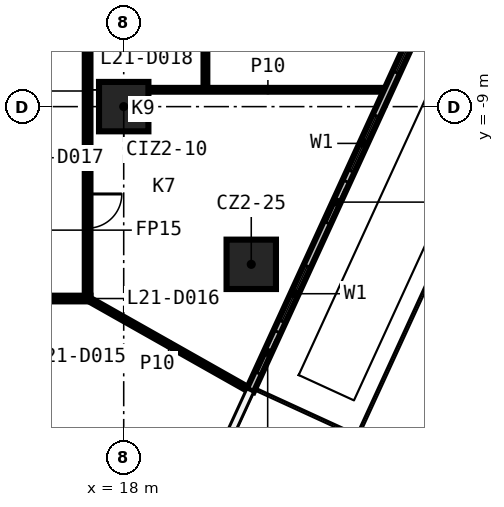
"""IFC4 building model, lengths in metres.
Left out: names, types, materials, properties, quantities, classifications, styles, units other than length and angle.
Written with IfcOpenShell. Run it as: python <this file> out.ifc"""

import sys

from ifc_helpers import new_model, si_unit, direction, frame, frame_2d, origin, origin_2d, place, context, subcontext, project, spatial, rectangle, extrude, element, fill, save


model = new_model("IFC4")
c1 = context("Model", 3, precision=1e-05, world=origin(), true_north=direction((0.0, 1.0)))
c2 = subcontext(c1, "Body", "Model", "MODEL_VIEW")
j1 = project(units=[si_unit("LENGTHUNIT", "METRE"), si_unit("PLANEANGLEUNIT", "RADIAN")], contexts=[c1])
p1 = place(None, origin())
s1 = spatial("IfcSite", under=j1, at=p1, CompositionType="ELEMENT")
p2 = place(p1, origin())
s2 = spatial("IfcBuilding", under=s1, at=p2, CompositionType="ELEMENT")
p3 = place(p2, frame((0.0, 0.0, 102.6)))
s3 = spatial("IfcBuildingStorey", under=s2, at=p3, CompositionType="ELEMENT", Elevation=102.6)
for number, where, z_axis, x_axis in (
    (1, (21.356, -13.15, 0.0), (0.0, 0.0, 1.0), (1.0, 0.0, 0.0)),
    (2, (18.0, -9.0, 0.0), (0.0, 0.0, 1.0), (1.0, 0.0, 0.0)),
):
    element("IfcColumn", number, at=place(p3, frame(where, z_axis=z_axis, x_axis=x_axis)), inside=s3, PredefinedType="COLUMN", context=c2, shape_type="SweptSolid", body=[
        extrude(rectangle(XDim=1.3, YDim=1.3, at=origin_2d()), origin(), (0.0, 0.0, 1.0), 3.3),
    ])
p4 = place(p3, frame((17.125, -14.05, 0.0), z_axis=(0.0, 0.0, 1.0), x_axis=(-1.0, 0.0, 0.0)))
e3 = element("IfcWall", 3, at=p4, inside=s3, PredefinedType="PARTITIONING", context=c2, shape_type="SweptSolid", body=[
    extrude(rectangle(XDim=34.25, YDim=0.15, at=frame_2d((17.125, 0.0))), origin(), (0.0, 0.0, 1.0), 3.3),
])
p5 = place(p4, frame((32.158, 0.0, 0.0)))
e4 = element("IfcOpeningElement", 4, at=p5, cuts=e3, PredefinedType="OPENING", context=c2, shape_type="SweptSolid", body=[
    extrude(rectangle(XDim=0.9, YDim=2.1, at=frame_2d((0.45, 1.05))), frame((0.0, 0.085, 0.0), z_axis=(0.0, -1.0, 0.0), x_axis=(1.0, 0.0, 0.0)), (0.0, 0.0, 1.0), 0.17),
])
p6 = place(p4, frame((27.561, 0.0, 0.0)))
e5 = element("IfcOpeningElement", 5, at=p6, cuts=e3, PredefinedType="OPENING", context=c2, shape_type="SweptSolid", body=[
    extrude(rectangle(XDim=1.0, YDim=2.1, at=frame_2d((0.5, 1.05))), frame((0.0, 0.085, 0.0), z_axis=(0.0, -1.0, 0.0), x_axis=(1.0, 0.0, 0.0)), (0.0, 0.0, 1.0), 0.17),
])
p7 = place(p4, frame((18.64, 0.0, 0.0)))
e6 = element("IfcOpeningElement", 6, at=p7, cuts=e3, PredefinedType="OPENING", context=c2, shape_type="SweptSolid", body=[
    extrude(rectangle(XDim=1.0, YDim=2.1, at=frame_2d((0.5, 1.05))), frame((0.0, 0.085, 0.0), z_axis=(0.0, -1.0, 0.0), x_axis=(1.0, 0.0, 0.0)), (0.0, 0.0, 1.0), 0.17),
])
p8 = place(p4, frame((16.624, 0.0, 0.0)))
e7 = element("IfcOpeningElement", 7, at=p8, cuts=e3, PredefinedType="OPENING", context=c2, shape_type="SweptSolid", body=[
    extrude(rectangle(XDim=1.0, YDim=2.1, at=frame_2d((0.5, 1.05))), frame((0.0, 0.085, 0.0), z_axis=(0.0, -1.0, 0.0), x_axis=(1.0, 0.0, 0.0)), (0.0, 0.0, 1.0), 0.17),
])
p9 = place(p4, frame((9.807, 0.0, 0.0)))
e8 = element("IfcOpeningElement", 8, at=p9, cuts=e3, PredefinedType="OPENING", context=c2, shape_type="SweptSolid", body=[
    extrude(rectangle(XDim=1.0, YDim=2.1, at=frame_2d((0.5, 1.05))), frame((0.0, 0.085, 0.0), z_axis=(0.0, -1.0, 0.0), x_axis=(1.0, 0.0, 0.0)), (0.0, 0.0, 1.0), 0.17),
])
p10 = place(p4, frame((7.795, 0.0, 0.0)))
e9 = element("IfcOpeningElement", 9, at=p10, cuts=e3, PredefinedType="OPENING", context=c2, shape_type="SweptSolid", body=[
    extrude(rectangle(XDim=1.0, YDim=2.1, at=frame_2d((0.5, 1.05))), frame((0.0, 0.085, 0.0), z_axis=(0.0, -1.0, 0.0), x_axis=(1.0, 0.0, 0.0)), (0.0, 0.0, 1.0), 0.17),
])
p11 = place(p4, frame((1.119, 0.0, 0.0)))
e10 = element("IfcOpeningElement", 10, at=p11, cuts=e3, PredefinedType="OPENING", context=c2, shape_type="SweptSolid", body=[
    extrude(rectangle(XDim=1.0, YDim=2.1, at=frame_2d((0.5, 1.05))), frame((0.0, 0.085, 0.0), z_axis=(0.0, -1.0, 0.0), x_axis=(1.0, 0.0, 0.0)), (0.0, 0.0, 1.0), 0.17),
])
p12 = place(p3, frame((18.65, -8.557, 0.0), z_axis=(0.0, 0.0, 1.0), x_axis=(1.0, 0.0, 0.0)))
e11 = element("IfcWall", 11, at=p12, inside=s3, PredefinedType="PARTITIONING", context=c2, shape_type="SweptSolid", body=[
    extrude(rectangle(XDim=6.288, YDim=0.1, at=frame_2d((3.144, 0.0))), origin(), (0.0, 0.0, 1.0), 3.3),
])
p13 = place(p3, frame((20.15, -8.507, 0.0), z_axis=(0.0, 0.0, 1.0), x_axis=(0.0, 1.0, 0.0)))
e12 = element("IfcWall", 12, at=p13, inside=s3, PredefinedType="PARTITIONING", context=c2, shape_type="SweptSolid", body=[
    extrude(rectangle(XDim=2.3, YDim=0.1, at=frame_2d((1.15, 0.0))), origin(), (0.0, 0.0, 1.0), 3.3),
])
p14 = place(p3, frame((17.05, 13.975, 0.0), z_axis=(0.0, 0.0, 1.0), x_axis=(0.0, -1.0, 0.0)))
e13 = element("IfcWall", 13, at=p14, inside=s3, PredefinedType="PARTITIONING", context=c2, shape_type="SweptSolid", body=[
    extrude(rectangle(XDim=27.95, YDim=0.15, at=frame_2d((13.975, 0.0))), origin(), (0.0, 0.0, 1.0), 3.3),
])
p15 = place(p14, frame((25.274, 0.0, 0.0)))
e14 = element("IfcOpeningElement", 14, at=p15, cuts=e13, PredefinedType="OPENING", context=c2, shape_type="SweptSolid", body=[
    extrude(rectangle(XDim=0.9, YDim=2.1, at=frame_2d((0.45, 1.05))), frame((0.0, 0.085, 0.0), z_axis=(0.0, -1.0, 0.0), x_axis=(1.0, 0.0, 0.0)), (0.0, 0.0, 1.0), 0.17),
])
p16 = place(p14, frame((18.854, 0.0, 0.0)))
e15 = element("IfcOpeningElement", 15, at=p16, cuts=e13, PredefinedType="OPENING", context=c2, shape_type="SweptSolid", body=[
    extrude(rectangle(XDim=1.0, YDim=2.1, at=frame_2d((0.5, 1.05))), frame((0.0, 0.085, 0.0), z_axis=(0.0, -1.0, 0.0), x_axis=(1.0, 0.0, 0.0)), (0.0, 0.0, 1.0), 0.17),
])
p17 = place(p14, frame((17.299, 0.0, 0.0)))
e16 = element("IfcOpeningElement", 16, at=p17, cuts=e13, PredefinedType="OPENING", context=c2, shape_type="SweptSolid", body=[
    extrude(rectangle(XDim=1.0, YDim=2.1, at=frame_2d((0.5, 1.05))), frame((0.0, 0.085, 0.0), z_axis=(0.0, -1.0, 0.0), x_axis=(1.0, 0.0, 0.0)), (0.0, 0.0, 1.0), 0.17),
])
p18 = place(p14, frame((11.171, 0.0, 0.0)))
e17 = element("IfcOpeningElement", 17, at=p18, cuts=e13, PredefinedType="OPENING", context=c2, shape_type="SweptSolid", body=[
    extrude(rectangle(XDim=0.9, YDim=2.1, at=frame_2d((0.45, 1.05))), frame((0.0, 0.085, 0.0), z_axis=(0.0, -1.0, 0.0), x_axis=(1.0, 0.0, 0.0)), (0.0, 0.0, 1.0), 0.17),
])
p19 = place(p14, frame((7.243, 0.0, 0.0)))
e18 = element("IfcOpeningElement", 18, at=p19, cuts=e13, PredefinedType="OPENING", context=c2, shape_type="SweptSolid", body=[
    extrude(rectangle(XDim=0.9, YDim=2.1, at=frame_2d((0.45, 1.05))), frame((0.0, 0.085, 0.0), z_axis=(0.0, -1.0, 0.0), x_axis=(1.0, 0.0, 0.0)), (0.0, 0.0, 1.0), 0.17),
])
p20 = place(p14, frame((2.153, 0.0, 0.0)))
e19 = element("IfcOpeningElement", 19, at=p20, cuts=e13, PredefinedType="OPENING", context=c2, shape_type="SweptSolid", body=[
    extrude(rectangle(XDim=0.9, YDim=2.1, at=frame_2d((0.45, 1.05))), frame((0.0, 0.085, 0.0), z_axis=(0.0, -1.0, 0.0), x_axis=(1.0, 0.0, 0.0)), (0.0, 0.0, 1.0), 0.17),
])
p21 = place(p3, frame((17.05, -14.05, 0.0), z_axis=(0.0, 0.0, 1.0), x_axis=(0.87059349, -0.492003023537, 0.0)))
e20 = element("IfcWall", 20, at=p21, inside=s3, PredefinedType="PARTITIONING", context=c2, shape_type="SweptSolid", body=[
    extrude(rectangle(XDim=4.895, YDim=0.1, at=frame_2d((2.448, 0.0))), origin(), (0.0, 0.0, 1.0), 3.3),
])
p22 = place(p3, frame((21.329, -16.468, 0.0), z_axis=(0.0, 0.0, 1.0), x_axis=(0.417117833448, 0.908852415423, 0.0)))
e21 = element("IfcWall", 21, at=p22, inside=s3, PredefinedType="SOLIDWALL", context=c2, shape_type="SweptSolid", body=[
    extrude(rectangle(XDim=21.761, YDim=0.2, at=frame_2d((10.881, 0.0))), origin(), (0.0, 0.0, 1.0), 3.25),
])
p23 = place(p22, frame((2.0, 0.0, 0.6)))
e22 = element("IfcOpeningElement", 22, at=p23, cuts=e21, PredefinedType="OPENING", context=c2, shape_type="SweptSolid", body=[
    extrude(rectangle(XDim=1.6, YDim=2.4, at=frame_2d((0.8, 1.2))), frame((0.0, 0.11, 0.0), z_axis=(0.0, -1.0, 0.0), x_axis=(1.0, 0.0, 0.0)), (0.0, 0.0, 1.0), 0.22),
])
p24 = place(p22, frame((0.5, 0.0, 0.0)))
e23 = element("IfcOpeningElement", 23, at=p24, cuts=e21, PredefinedType="OPENING", context=c2, shape_type="SweptSolid", body=[
    extrude(rectangle(XDim=1.2, YDim=2.4, at=frame_2d((0.6, 1.2))), frame((0.0, 0.11, 0.0), z_axis=(0.0, -1.0, 0.0), x_axis=(1.0, 0.0, 0.0)), (0.0, 0.0, 1.0), 0.22),
])
p25 = place(p22, frame((6.352, 0.0, 0.6)))
e24 = element("IfcOpeningElement", 24, at=p25, cuts=e21, PredefinedType="OPENING", context=c2, shape_type="SweptSolid", body=[
    extrude(rectangle(XDim=1.6, YDim=2.4, at=frame_2d((0.8, 1.2))), frame((0.0, 0.11, 0.0), z_axis=(0.0, -1.0, 0.0), x_axis=(1.0, 0.0, 0.0)), (0.0, 0.0, 1.0), 0.22),
])
p26 = place(p22, frame((4.852, 0.0, 0.0)))
e25 = element("IfcOpeningElement", 25, at=p26, cuts=e21, PredefinedType="OPENING", context=c2, shape_type="SweptSolid", body=[
    extrude(rectangle(XDim=1.2, YDim=2.4, at=frame_2d((0.6, 1.2))), frame((0.0, 0.11, 0.0), z_axis=(0.0, -1.0, 0.0), x_axis=(1.0, 0.0, 0.0)), (0.0, 0.0, 1.0), 0.22),
])
p27 = place(p22, frame((9.205, 0.0, 0.6)))
e26 = element("IfcOpeningElement", 26, at=p27, cuts=e21, PredefinedType="OPENING", context=c2, shape_type="SweptSolid", body=[
    extrude(rectangle(XDim=1.6, YDim=2.4, at=frame_2d((0.8, 1.2))), frame((0.0, 0.11, 0.0), z_axis=(0.0, -1.0, 0.0), x_axis=(1.0, 0.0, 0.0)), (0.0, 0.0, 1.0), 0.22),
])
p28 = place(p22, frame((11.205, 0.0, 0.0)))
e27 = element("IfcOpeningElement", 27, at=p28, cuts=e21, PredefinedType="OPENING", context=c2, shape_type="SweptSolid", body=[
    extrude(rectangle(XDim=1.2, YDim=2.4, at=frame_2d((0.6, 1.2))), frame((0.0, 0.11, 0.0), z_axis=(0.0, -1.0, 0.0), x_axis=(1.0, 0.0, 0.0)), (0.0, 0.0, 1.0), 0.22),
])
p29 = place(p22, frame((15.057, 0.0, 0.6)))
e28 = element("IfcOpeningElement", 28, at=p29, cuts=e21, PredefinedType="OPENING", context=c2, shape_type="SweptSolid", body=[
    extrude(rectangle(XDim=1.6, YDim=2.4, at=frame_2d((0.8, 1.2))), frame((0.0, 0.11, 0.0), z_axis=(0.0, -1.0, 0.0), x_axis=(1.0, 0.0, 0.0)), (0.0, 0.0, 1.0), 0.22),
])
p30 = place(p22, frame((13.557, 0.0, 0.0)))
e29 = element("IfcOpeningElement", 29, at=p30, cuts=e21, PredefinedType="OPENING", context=c2, shape_type="SweptSolid", body=[
    extrude(rectangle(XDim=1.2, YDim=2.4, at=frame_2d((0.6, 1.2))), frame((0.0, 0.11, 0.0), z_axis=(0.0, -1.0, 0.0), x_axis=(1.0, 0.0, 0.0)), (0.0, 0.0, 1.0), 0.22),
])
p31 = place(p22, frame((19.909, 0.0, 0.6)))
e30 = element("IfcOpeningElement", 30, at=p31, cuts=e21, PredefinedType="OPENING", context=c2, shape_type="SweptSolid", body=[
    extrude(rectangle(XDim=1.6, YDim=2.4, at=frame_2d((0.8, 1.2))), frame((0.0, 0.11, 0.0), z_axis=(0.0, -1.0, 0.0), x_axis=(1.0, 0.0, 0.0)), (0.0, 0.0, 1.0), 0.22),
])
p32 = place(p22, frame((18.409, 0.0, 0.0)))
e31 = element("IfcOpeningElement", 31, at=p32, cuts=e21, PredefinedType="OPENING", context=c2, shape_type="SweptSolid", body=[
    extrude(rectangle(XDim=1.2, YDim=2.4, at=frame_2d((0.6, 1.2))), frame((0.0, 0.11, 0.0), z_axis=(0.0, -1.0, 0.0), x_axis=(1.0, 0.0, 0.0)), (0.0, 0.0, 1.0), 0.22),
])
p33 = place(p15, origin())
e32 = element("IfcDoor", 32, at=p33, inside=s3, OperationType="SINGLE_SWING_LEFT", PredefinedType="DOOR", context=c2, shape_type="SweptSolid", body=[
    extrude(rectangle(XDim=0.9, YDim=2.1, at=frame_2d((0.45, 1.05))), frame((0.0, 0.025, 0.0), z_axis=(0.0, -1.0, 0.0), x_axis=(1.0, 0.0, 0.0)), (0.0, 0.0, 1.0), 0.05),
])
fill(e14, e32)
p34 = place(p23, origin())
e33 = element("IfcWindow", 33, at=p34, inside=s3, PartitioningType="SINGLE_PANEL", PredefinedType="WINDOW", context=c2, shape_type="SweptSolid", body=[
    extrude(rectangle(XDim=1.6, YDim=2.4, at=frame_2d((0.8, 1.2))), frame((0.0, 0.03, 0.0), z_axis=(0.0, -1.0, 0.0), x_axis=(1.0, 0.0, 0.0)), (0.0, 0.0, 1.0), 0.06),
])
fill(e22, e33)
p35 = place(p24, origin())
e34 = element("IfcDoor", 34, at=p35, inside=s3, OperationType="SLIDING_TO_LEFT", PredefinedType="DOOR", context=c2, shape_type="SweptSolid", body=[
    extrude(rectangle(XDim=1.2, YDim=2.4, at=frame_2d((0.6, 1.2))), frame((0.0, 0.025, 0.0), z_axis=(0.0, -1.0, 0.0), x_axis=(1.0, 0.0, 0.0)), (0.0, 0.0, 1.0), 0.05),
])
fill(e23, e34)
p36 = place(p25, origin())
e35 = element("IfcWindow", 35, at=p36, inside=s3, PartitioningType="SINGLE_PANEL", PredefinedType="WINDOW", context=c2, shape_type="SweptSolid", body=[
    extrude(rectangle(XDim=1.6, YDim=2.4, at=frame_2d((0.8, 1.2))), frame((0.0, 0.03, 0.0), z_axis=(0.0, -1.0, 0.0), x_axis=(1.0, 0.0, 0.0)), (0.0, 0.0, 1.0), 0.06),
])
fill(e24, e35)
p37 = place(p26, origin())
e36 = element("IfcDoor", 36, at=p37, inside=s3, OperationType="SLIDING_TO_LEFT", PredefinedType="DOOR", context=c2, shape_type="SweptSolid", body=[
    extrude(rectangle(XDim=1.2, YDim=2.4, at=frame_2d((0.6, 1.2))), frame((0.0, 0.025, 0.0), z_axis=(0.0, -1.0, 0.0), x_axis=(1.0, 0.0, 0.0)), (0.0, 0.0, 1.0), 0.05),
])
fill(e25, e36)
p38 = place(p27, origin())
e37 = element("IfcWindow", 37, at=p38, inside=s3, PartitioningType="SINGLE_PANEL", PredefinedType="WINDOW", context=c2, shape_type="SweptSolid", body=[
    extrude(rectangle(XDim=1.6, YDim=2.4, at=frame_2d((0.8, 1.2))), frame((0.0, 0.03, 0.0), z_axis=(0.0, -1.0, 0.0), x_axis=(1.0, 0.0, 0.0)), (0.0, 0.0, 1.0), 0.06),
])
fill(e26, e37)
save(model, sys.argv[1])
